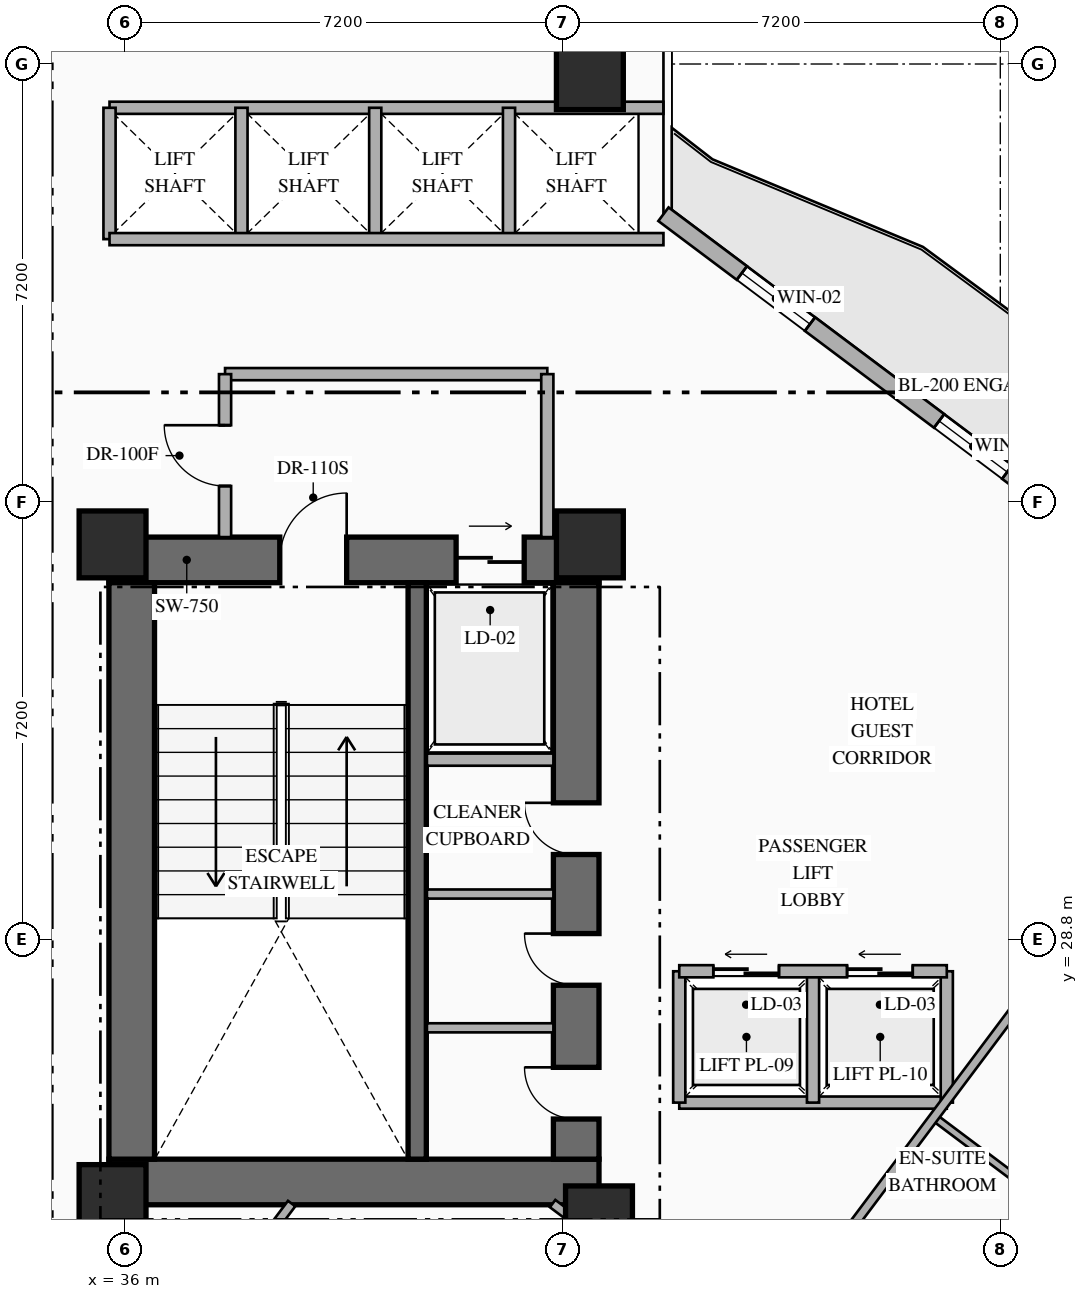
"""IFC4 building model, lengths in metres.
Left out: names, types, materials, properties, quantities, classifications, styles, units other than length and angle.
Written with IfcOpenShell. Run it as: python <this file> out.ifc"""

import sys

from ifc_helpers import new_model, si_unit, direction, frame, frame_2d, origin, origin_2d, place, context, subcontext, project, spatial, rectangle, extrude, element, fill, save


model = new_model("IFC4")
c1 = context("Model", 3, precision=1e-05, world=origin(), true_north=direction((0.0, 1.0)))
c2 = subcontext(c1, "Body", "Model", "MODEL_VIEW")
j1 = project(units=[si_unit("LENGTHUNIT", "METRE"), si_unit("PLANEANGLEUNIT", "RADIAN")], contexts=[c1])
p1 = place(None, origin())
s1 = spatial("IfcSite", under=j1, at=p1, CompositionType="ELEMENT")
p2 = place(p1, origin())
s2 = spatial("IfcBuilding", under=s1, at=p2, CompositionType="ELEMENT")
p3 = place(p2, frame((0.0, 0.0, 81.3)))
s3 = spatial("IfcBuildingStorey", under=s2, at=p3, CompositionType="ELEMENT", Elevation=81.3)
p4 = place(p3, frame((35.74, 24.815, 0.0), z_axis=(0.0, 0.0, 1.0), x_axis=(1.0, 0.0, 0.0)))
e1 = element("IfcWall", 1, at=p4, inside=s3, PredefinedType="SHEAR", context=c2, shape_type="SweptSolid", body=[
    extrude(rectangle(XDim=8.06, YDim=0.75, at=frame_2d((4.03, 0.0))), origin(), (0.0, 0.0, 1.0), 3.35),
])
p5 = place(p3, frame((35.74, 35.045, 0.0), z_axis=(0.0, 0.0, 1.0), x_axis=(1.0, 0.0, 0.0)))
e2 = element("IfcWall", 2, at=p5, inside=s3, PredefinedType="SHEAR", context=c2, shape_type="SweptSolid", body=[
    extrude(rectangle(XDim=8.06, YDim=0.75, at=frame_2d((4.03, 0.0))), origin(), (0.0, 0.0, 1.0), 3.35),
])
p6 = place(p5, frame((2.81, 0.0, 0.0)))
e3 = element("IfcOpeningElement", 3, at=p6, cuts=e2, PredefinedType="OPENING", context=c2, shape_type="SweptSolid", body=[
    extrude(rectangle(XDim=1.1, YDim=2.2, at=frame_2d((0.55, 1.1))), frame((0.0, 0.385, 0.0), z_axis=(0.0, -1.0, 0.0), x_axis=(1.0, 0.0, 0.0)), (0.0, 0.0, 1.0), 0.77),
])
p7 = place(p5, frame((5.71, 0.0, 0.0)))
e4 = element("IfcOpeningElement", 4, at=p7, cuts=e2, PredefinedType="OPENING", context=c2, shape_type="SweptSolid", body=[
    extrude(rectangle(XDim=1.12, YDim=2.15, at=frame_2d((0.56, 1.075))), frame((0.0, 0.385, 0.0), z_axis=(0.0, -1.0, 0.0), x_axis=(1.0, 0.0, 0.0)), (0.0, 0.0, 1.0), 0.77),
])
p8 = place(p3, frame((36.115, 25.19, 0.0), z_axis=(0.0, 0.0, 1.0), x_axis=(0.0, 1.0, 0.0)))
e5 = element("IfcWall", 5, at=p8, inside=s3, PredefinedType="SHEAR", context=c2, shape_type="SweptSolid", body=[
    extrude(rectangle(XDim=9.48, YDim=0.75, at=frame_2d((4.74, 0.0))), origin(), (0.0, 0.0, 1.0), 3.35),
])
p9 = place(p3, frame((43.425, 25.19, 0.0), z_axis=(0.0, 0.0, 1.0), x_axis=(0.0, 1.0, 0.0)))
e6 = element("IfcWall", 6, at=p9, inside=s3, PredefinedType="SHEAR", context=c2, shape_type="SweptSolid", body=[
    extrude(rectangle(XDim=9.48, YDim=0.75, at=frame_2d((4.74, 0.0))), origin(), (0.0, 0.0, 1.0), 3.35),
])
p10 = place(p9, frame((0.66, 0.0, 0.0)))
e7 = element("IfcOpeningElement", 7, at=p10, cuts=e6, PredefinedType="OPENING", context=c2, shape_type="SweptSolid", body=[
    extrude(rectangle(XDim=0.85, YDim=2.08, at=frame_2d((0.425, 1.04))), frame((0.0, 0.385, 0.0), z_axis=(0.0, -1.0, 0.0), x_axis=(1.0, 0.0, 0.0)), (0.0, 0.0, 1.0), 0.77),
])
p11 = place(p9, frame((2.86, 0.0, 0.0)))
e8 = element("IfcOpeningElement", 8, at=p11, cuts=e6, PredefinedType="OPENING", context=c2, shape_type="SweptSolid", body=[
    extrude(rectangle(XDim=0.85, YDim=2.08, at=frame_2d((0.425, 1.04))), frame((0.0, 0.385, 0.0), z_axis=(0.0, -1.0, 0.0), x_axis=(1.0, 0.0, 0.0)), (0.0, 0.0, 1.0), 0.77),
])
p12 = place(p9, frame((5.01, 0.0, 0.0)))
e9 = element("IfcOpeningElement", 9, at=p12, cuts=e6, PredefinedType="OPENING", context=c2, shape_type="SweptSolid", body=[
    extrude(rectangle(XDim=0.85, YDim=2.08, at=frame_2d((0.425, 1.04))), frame((0.0, 0.385, 0.0), z_axis=(0.0, -1.0, 0.0), x_axis=(1.0, 0.0, 0.0)), (0.0, 0.0, 1.0), 0.77),
])
p13 = place(p3, frame((40.81, 25.19, 0.0), z_axis=(0.0, 0.0, 1.0), x_axis=(0.0, 1.0, 0.0)))
e10 = element("IfcWall", 10, at=p13, inside=s3, PredefinedType="SHEAR", context=c2, shape_type="SweptSolid", body=[
    extrude(rectangle(XDim=9.48, YDim=0.3, at=frame_2d((4.74, 0.0))), origin(), (0.0, 0.0, 1.0), 3.35),
])
for number, where, z_axis, x_axis in (
    (11, (35.8, 24.55, 0.0), (0.0, 0.0, 1.0), (1.0, 0.0, 0.0)),
    (12, (43.8, 24.2, 0.0), (0.0, 0.0, 1.0), (1.0, 0.0, 0.0)),
    (13, (35.8, 35.3, 0.0), (0.0, 0.0, 1.0), (1.0, 0.0, 0.0)),
    (14, (43.65, 35.3, 0.0), (0.0, 0.0, 1.0), (1.0, 0.0, 0.0)),
    (15, (43.65, 43.0, 0.0), (0.0, 0.0, 1.0), (1.0, 0.0, 0.0)),
):
    element("IfcColumn", number, at=place(p3, frame(where, z_axis=z_axis, x_axis=x_axis)), inside=s3, PredefinedType="COLUMN", context=c2, shape_type="SweptSolid", body=[
        extrude(rectangle(XDim=1.1, YDim=1.1, at=origin_2d()), origin(), (0.0, 0.0, 1.0), 3.35),
    ])
p14 = place(p3, frame((44.86, 40.73, 0.0), z_axis=(0.0, 0.0, 1.0), x_axis=(0.800006902154, -0.599990797017, 0.0)))
e16 = element("IfcWall", 16, at=p14, inside=s3, PredefinedType="STANDARD", context=c2, shape_type="SweptSolid", body=[
    extrude(rectangle(XDim=29.712, YDim=0.28, at=frame_2d((14.856, 0.0))), origin(), (0.0, 0.0, 1.0), 3.13),
])
p15 = place(p14, frame((14.249, 0.0, 0.0)))
e17 = element("IfcOpeningElement", 17, at=p15, cuts=e16, PredefinedType="OPENING", context=c2, shape_type="SweptSolid", body=[
    extrude(rectangle(XDim=1.1, YDim=2.2, at=frame_2d((0.55, 1.1))), frame((0.0, 0.15, 0.0), z_axis=(0.0, -1.0, 0.0), x_axis=(1.0, 0.0, 0.0)), (0.0, 0.0, 1.0), 0.3),
])
p16 = place(p14, frame((1.612, 0.0, 0.85)))
e18 = element("IfcOpeningElement", 18, at=p16, cuts=e16, PredefinedType="OPENING", context=c2, shape_type="SweptSolid", body=[
    extrude(rectangle(XDim=1.4, YDim=1.8, at=frame_2d((0.7, 0.9))), frame((0.0, 0.15, 0.0), z_axis=(0.0, -1.0, 0.0), x_axis=(1.0, 0.0, 0.0)), (0.0, 0.0, 1.0), 0.3),
])
p17 = place(p14, frame((5.667, 0.0, 0.85)))
e19 = element("IfcOpeningElement", 19, at=p17, cuts=e16, PredefinedType="OPENING", context=c2, shape_type="SweptSolid", body=[
    extrude(rectangle(XDim=1.4, YDim=1.8, at=frame_2d((0.7, 0.9))), frame((0.0, 0.15, 0.0), z_axis=(0.0, -1.0, 0.0), x_axis=(1.0, 0.0, 0.0)), (0.0, 0.0, 1.0), 0.3),
])
p18 = place(p14, frame((9.912, 0.0, 0.85)))
e20 = element("IfcOpeningElement", 20, at=p18, cuts=e16, PredefinedType="OPENING", context=c2, shape_type="SweptSolid", body=[
    extrude(rectangle(XDim=1.4, YDim=1.8, at=frame_2d((0.7, 0.9))), frame((0.0, 0.15, 0.0), z_axis=(0.0, -1.0, 0.0), x_axis=(1.0, 0.0, 0.0)), (0.0, 0.0, 1.0), 0.3),
])
p19 = place(p14, frame((19.528, 0.0, 0.85)))
e21 = element("IfcOpeningElement", 21, at=p19, cuts=e16, PredefinedType="OPENING", context=c2, shape_type="SweptSolid", body=[
    extrude(rectangle(XDim=1.4, YDim=1.8, at=frame_2d((0.7, 0.9))), frame((0.0, 0.15, 0.0), z_axis=(0.0, -1.0, 0.0), x_axis=(1.0, 0.0, 0.0)), (0.0, 0.0, 1.0), 0.3),
])
p20 = place(p14, frame((23.451, 0.0, 0.85)))
e22 = element("IfcOpeningElement", 22, at=p20, cuts=e16, PredefinedType="OPENING", context=c2, shape_type="SweptSolid", body=[
    extrude(rectangle(XDim=1.4, YDim=1.8, at=frame_2d((0.7, 0.9))), frame((0.0, 0.15, 0.0), z_axis=(0.0, -1.0, 0.0), x_axis=(1.0, 0.0, 0.0)), (0.0, 0.0, 1.0), 0.3),
])
p21 = place(p14, frame((27.852, 0.0, 0.85)))
e23 = element("IfcOpeningElement", 23, at=p21, cuts=e16, PredefinedType="OPENING", context=c2, shape_type="SweptSolid", body=[
    extrude(rectangle(XDim=1.4, YDim=1.8, at=frame_2d((0.7, 0.9))), frame((0.0, 0.15, 0.0), z_axis=(0.0, -1.0, 0.0), x_axis=(1.0, 0.0, 0.0)), (0.0, 0.0, 1.0), 0.3),
])
p22 = place(p3, frame((40.97, 31.76, 0.0), z_axis=(0.0, 0.0, 1.0), x_axis=(1.0, 0.0, 0.0)))
e24 = element("IfcWall", 24, at=p22, inside=s3, PredefinedType="STANDARD", context=c2, shape_type="SweptSolid", body=[
    extrude(rectangle(XDim=2.08, YDim=0.2, at=frame_2d((1.04, 0.0))), origin(), (0.0, 0.0, 1.0), 3.13),
])
for number, where, z_axis, x_axis in (
    (25, (40.97, 27.35, 0.0), (0.0, 0.0, 1.0), (1.0, 0.0, 0.0)),
    (26, (40.97, 29.55, 0.0), (0.0, 0.0, 1.0), (1.0, 0.0, 0.0)),
):
    element("IfcWall", number, at=place(p3, frame(where, z_axis=z_axis, x_axis=x_axis)), inside=s3, PredefinedType="PARTITIONING", context=c2, shape_type="SweptSolid", body=[
        extrude(rectangle(XDim=2.08, YDim=0.15, at=frame_2d((1.04, 0.0))), origin(), (0.0, 0.0, 1.0), 3.13),
    ])
p23 = place(p3, frame((37.65, 38.1, 0.0), z_axis=(0.0, 0.0, 1.0), x_axis=(1.0, 0.0, 0.0)))
e27 = element("IfcWall", 27, at=p23, inside=s3, PredefinedType="STANDARD", context=c2, shape_type="SweptSolid", body=[
    extrude(rectangle(XDim=5.3, YDim=0.2, at=frame_2d((2.65, 0.0))), origin(), (0.0, 0.0, 1.0), 3.13),
])
p24 = place(p3, frame((42.95, 35.42, 0.0), z_axis=(0.0, 0.0, 1.0), x_axis=(0.0, 1.0, 0.0)))
e28 = element("IfcWall", 28, at=p24, inside=s3, PredefinedType="STANDARD", context=c2, shape_type="SweptSolid", body=[
    extrude(rectangle(XDim=2.68, YDim=0.2, at=frame_2d((1.34, 0.0))), origin(), (0.0, 0.0, 1.0), 3.13),
])
p25 = place(p3, frame((37.65, 35.42, 0.0), z_axis=(0.0, 0.0, 1.0), x_axis=(0.0, 1.0, 0.0)))
e29 = element("IfcWall", 29, at=p25, inside=s3, PredefinedType="STANDARD", context=c2, shape_type="SweptSolid", body=[
    extrude(rectangle(XDim=2.68, YDim=0.2, at=frame_2d((1.34, 0.0))), origin(), (0.0, 0.0, 1.0), 3.13),
])
p26 = place(p25, frame((0.84, 0.0, 0.0)))
e30 = element("IfcOpeningElement", 30, at=p26, cuts=e29, PredefinedType="OPENING", context=c2, shape_type="SweptSolid", body=[
    extrude(rectangle(XDim=1.0, YDim=2.2, at=frame_2d((0.5, 1.1))), frame((0.0, 0.11, 0.0), z_axis=(0.0, -1.0, 0.0), x_axis=(1.0, 0.0, 0.0)), (0.0, 0.0, 1.0), 0.22),
])
p27 = place(p3, frame((35.75, 42.48, 0.0), z_axis=(0.0, 0.0, 1.0), x_axis=(1.0, 0.0, 0.0)))
e31 = element("IfcWall", 31, at=p27, inside=s3, PredefinedType="STANDARD", context=c2, shape_type="SweptSolid", body=[
    extrude(rectangle(XDim=9.11, YDim=0.2, at=frame_2d((4.555, 0.0))), origin(), (0.0, 0.0, 1.0), 3.13),
])
for number, where, z_axis, x_axis in (
    (32, (35.75, 40.32, 0.0), (0.0, 0.0, 1.0), (0.0, 1.0, 0.0)),
    (33, (37.92, 40.32, 0.0), (0.0, 0.0, 1.0), (0.0, 1.0, 0.0)),
    (34, (40.12, 40.32, 0.0), (0.0, 0.0, 1.0), (0.0, 1.0, 0.0)),
    (35, (42.32, 40.32, 0.0), (0.0, 0.0, 1.0), (0.0, 1.0, 0.0)),
):
    element("IfcWall", number, at=place(p3, frame(where, z_axis=z_axis, x_axis=x_axis)), inside=s3, PredefinedType="STANDARD", context=c2, shape_type="SweptSolid", body=[
        extrude(rectangle(XDim=2.16, YDim=0.2, at=frame_2d((1.08, 0.0))), origin(), (0.0, 0.0, 1.0), 3.13),
    ])
p28 = place(p3, frame((35.75, 40.32, 0.0), z_axis=(0.0, 0.0, 1.0), x_axis=(1.0, 0.0, 0.0)))
e36 = element("IfcWall", 36, at=p28, inside=s3, PredefinedType="STANDARD", context=c2, shape_type="SweptSolid", body=[
    extrude(rectangle(XDim=9.11, YDim=0.2, at=frame_2d((4.555, 0.0))), origin(), (0.0, 0.0, 1.0), 3.13),
])
p29 = place(p3, frame((45.12, 26.12, 0.0), z_axis=(0.0, 0.0, 1.0), x_axis=(1.0, 0.0, 0.0)))
e37 = element("IfcWall", 37, at=p29, inside=s3, PredefinedType="STANDARD", context=c2, shape_type="SweptSolid", body=[
    extrude(rectangle(XDim=4.4, YDim=0.2, at=frame_2d((2.2, 0.0))), origin(), (0.0, 0.0, 1.0), 3.13),
])
for number, where, z_axis, x_axis in (
    (38, (45.12, 26.12, 0.0), (0.0, 0.0, 1.0), (0.0, 1.0, 0.0)),
    (39, (49.52, 26.12, 0.0), (0.0, 0.0, 1.0), (0.0, 1.0, 0.0)),
    (40, (47.32, 26.12, 0.0), (0.0, 0.0, 1.0), (0.0, 1.0, 0.0)),
):
    element("IfcWall", number, at=place(p3, frame(where, z_axis=z_axis, x_axis=x_axis)), inside=s3, PredefinedType="STANDARD", context=c2, shape_type="SweptSolid", body=[
        extrude(rectangle(XDim=2.16, YDim=0.2, at=frame_2d((1.08, 0.0))), origin(), (0.0, 0.0, 1.0), 3.13),
    ])
p30 = place(p3, frame((45.12, 28.28, 0.0), z_axis=(0.0, 0.0, 1.0), x_axis=(1.0, 0.0, 0.0)))
e41 = element("IfcWall", 41, at=p30, inside=s3, PredefinedType="STANDARD", context=c2, shape_type="SweptSolid", body=[
    extrude(rectangle(XDim=4.4, YDim=0.2, at=frame_2d((2.2, 0.0))), origin(), (0.0, 0.0, 1.0), 3.13),
])
p31 = place(p30, frame((0.56, 0.0, 0.0)))
e42 = element("IfcOpeningElement", 42, at=p31, cuts=e41, PredefinedType="OPENING", context=c2, shape_type="SweptSolid", body=[
    extrude(rectangle(XDim=1.08, YDim=2.15, at=frame_2d((0.54, 1.075))), frame((0.0, 0.11, 0.0), z_axis=(0.0, -1.0, 0.0), x_axis=(1.0, 0.0, 0.0)), (0.0, 0.0, 1.0), 0.22),
])
p32 = place(p30, frame((2.76, 0.0, 0.0)))
e43 = element("IfcOpeningElement", 43, at=p32, cuts=e41, PredefinedType="OPENING", context=c2, shape_type="SweptSolid", body=[
    extrude(rectangle(XDim=1.08, YDim=2.15, at=frame_2d((0.54, 1.075))), frame((0.0, 0.11, 0.0), z_axis=(0.0, -1.0, 0.0), x_axis=(1.0, 0.0, 0.0)), (0.0, 0.0, 1.0), 0.22),
])
p33 = place(p3, frame((43.037, 24.46, 0.0), z_axis=(0.0, 0.0, 1.0), x_axis=(0.799971872363, -0.600037501685, 0.0)))
e44 = element("IfcWall", 44, at=p33, inside=s3, PredefinedType="PARTITIONING", context=c2, shape_type="SweptSolid", body=[
    extrude(rectangle(XDim=4.167, YDim=0.15, at=frame_2d((2.083, 0.0))), origin(), (0.0, 0.0, 1.0), 2.425),
])
p34 = place(p33, frame((2.468, 0.0, 0.0)))
e45 = element("IfcOpeningElement", 45, at=p34, cuts=e44, PredefinedType="OPENING", context=c2, shape_type="SweptSolid", body=[
    extrude(rectangle(XDim=0.95, YDim=2.15, at=frame_2d((0.475, 1.075))), frame((0.0, 0.085, 0.0), z_axis=(0.0, -1.0, 0.0), x_axis=(1.0, 0.0, 0.0)), (0.0, 0.0, 1.0), 0.17),
])
p35 = place(p3, frame((33.384, 17.312, 0.0), z_axis=(0.0, 0.0, 1.0), x_axis=(0.600008743659, 0.799993442181, 0.0)))
e46 = element("IfcWall", 46, at=p35, inside=s3, PredefinedType="PARTITIONING", context=c2, shape_type="SweptSolid", body=[
    extrude(rectangle(XDim=8.935, YDim=0.15, at=frame_2d((4.468, 0.0))), origin(), (0.0, 0.0, 1.0), 3.13),
])
p36 = place(p3, frame((49.59, 22.67, 0.0), z_axis=(0.0, 0.0, 1.0), x_axis=(0.599951172744, 0.800036618114, 0.0)))
e47 = element("IfcWall", 47, at=p36, inside=s3, PredefinedType="PARTITIONING", context=c2, shape_type="SweptSolid", body=[
    extrude(rectangle(XDim=2.4, YDim=0.12, at=frame_2d((1.2, 0.0))), origin(), (0.0, 0.0, 1.0), 3.13),
])
p37 = place(p36, frame((0.8, 0.0, 0.0)))
e48 = element("IfcOpeningElement", 48, at=p37, cuts=e47, PredefinedType="OPENING", context=c2, shape_type="SweptSolid", body=[
    extrude(rectangle(XDim=0.8, YDim=2.06, at=frame_2d((0.4, 1.03))), frame((0.0, 0.07, 0.0), z_axis=(0.0, -1.0, 0.0), x_axis=(1.0, 0.0, 0.0)), (0.0, 0.0, 1.0), 0.14),
])
p38 = place(p3, frame((49.31, 25.88, 0.0), z_axis=(0.0, 0.0, 1.0), x_axis=(0.800040880289, -0.59994548908, 0.0)))
e49 = element("IfcWall", 49, at=p38, inside=s3, PredefinedType="PARTITIONING", context=c2, shape_type="SweptSolid", body=[
    extrude(rectangle(XDim=2.15, YDim=0.12, at=frame_2d((1.075, 0.0))), origin(), (0.0, 0.0, 1.0), 3.13),
])
p39 = place(p3, frame((47.87, 23.96, 0.0), z_axis=(0.0, 0.0, 1.0), x_axis=(0.599996617946, 0.80000253653, 0.0)))
e50 = element("IfcWall", 50, at=p39, inside=s3, PredefinedType="PARTITIONING", context=c2, shape_type="SweptSolid", body=[
    extrude(rectangle(XDim=11.55, YDim=0.15, at=frame_2d((5.775, 0.0))), origin(), (0.0, 0.0, 1.0), 3.13),
])
p40 = place(p16, origin())
e51 = element("IfcWindow", 51, at=p40, inside=s3, PartitioningType="SINGLE_PANEL", PredefinedType="WINDOW", context=c2, shape_type="SweptSolid", body=[
    extrude(rectangle(XDim=1.4, YDim=1.8, at=frame_2d((0.7, 0.9))), frame((0.0, 0.03, 0.0), z_axis=(0.0, -1.0, 0.0), x_axis=(1.0, 0.0, 0.0)), (0.0, 0.0, 1.0), 0.06),
])
fill(e18, e51)
p41 = place(p17, origin())
e52 = element("IfcWindow", 52, at=p41, inside=s3, PartitioningType="SINGLE_PANEL", PredefinedType="WINDOW", context=c2, shape_type="SweptSolid", body=[
    extrude(rectangle(XDim=1.4, YDim=1.8, at=frame_2d((0.7, 0.9))), frame((0.0, 0.03, 0.0), z_axis=(0.0, -1.0, 0.0), x_axis=(1.0, 0.0, 0.0)), (0.0, 0.0, 1.0), 0.06),
])
fill(e19, e52)
p42 = place(p6, origin())
e53 = element("IfcDoor", 53, at=p42, inside=s3, OperationType="SINGLE_SWING_RIGHT", PredefinedType="DOOR", context=c2, shape_type="SweptSolid", body=[
    extrude(rectangle(XDim=1.1, YDim=2.2, at=frame_2d((0.55, 1.1))), frame((0.0, 0.025, 0.0), z_axis=(0.0, -1.0, 0.0), x_axis=(1.0, 0.0, 0.0)), (0.0, 0.0, 1.0), 0.05),
])
fill(e3, e53)
p43 = place(p7, origin())
e54 = element("IfcDoor", 54, at=p43, inside=s3, OperationType="SLIDING_TO_RIGHT", PredefinedType="USERDEFINED", context=c2, shape_type="SweptSolid", body=[
    extrude(rectangle(XDim=1.12, YDim=2.15, at=frame_2d((0.56, 1.075))), frame((0.0, 0.025, 0.0), z_axis=(0.0, -1.0, 0.0), x_axis=(1.0, 0.0, 0.0)), (0.0, 0.0, 1.0), 0.05),
])
fill(e4, e54)
p44 = place(p10, origin())
e55 = element("IfcDoor", 55, at=p44, inside=s3, OperationType="SINGLE_SWING_RIGHT", PredefinedType="DOOR", context=c2, shape_type="SweptSolid", body=[
    extrude(rectangle(XDim=0.85, YDim=2.08, at=frame_2d((0.425, 1.04))), frame((0.0, 0.025, 0.0), z_axis=(0.0, -1.0, 0.0), x_axis=(1.0, 0.0, 0.0)), (0.0, 0.0, 1.0), 0.05),
])
fill(e7, e55)
p45 = place(p11, origin())
e56 = element("IfcDoor", 56, at=p45, inside=s3, OperationType="SINGLE_SWING_RIGHT", PredefinedType="DOOR", context=c2, shape_type="SweptSolid", body=[
    extrude(rectangle(XDim=0.85, YDim=2.08, at=frame_2d((0.425, 1.04))), frame((0.0, 0.025, 0.0), z_axis=(0.0, -1.0, 0.0), x_axis=(1.0, 0.0, 0.0)), (0.0, 0.0, 1.0), 0.05),
])
fill(e8, e56)
p46 = place(p12, origin())
e57 = element("IfcDoor", 57, at=p46, inside=s3, OperationType="SINGLE_SWING_RIGHT", PredefinedType="DOOR", context=c2, shape_type="SweptSolid", body=[
    extrude(rectangle(XDim=0.85, YDim=2.08, at=frame_2d((0.425, 1.04))), frame((0.0, 0.025, 0.0), z_axis=(0.0, -1.0, 0.0), x_axis=(1.0, 0.0, 0.0)), (0.0, 0.0, 1.0), 0.05),
])
fill(e9, e57)
p47 = place(p26, origin())
e58 = element("IfcDoor", 58, at=p47, inside=s3, OperationType="SINGLE_SWING_RIGHT", PredefinedType="DOOR", context=c2, shape_type="SweptSolid", body=[
    extrude(rectangle(XDim=1.0, YDim=2.2, at=frame_2d((0.5, 1.1))), frame((0.0, 0.025, 0.0), z_axis=(0.0, -1.0, 0.0), x_axis=(1.0, 0.0, 0.0)), (0.0, 0.0, 1.0), 0.05),
])
fill(e30, e58)
p48 = place(p31, origin())
e59 = element("IfcDoor", 59, at=p48, inside=s3, OperationType="SLIDING_TO_LEFT", PredefinedType="USERDEFINED", context=c2, shape_type="SweptSolid", body=[
    extrude(rectangle(XDim=1.08, YDim=2.15, at=frame_2d((0.54, 1.075))), frame((0.0, 0.025, 0.0), z_axis=(0.0, -1.0, 0.0), x_axis=(1.0, 0.0, 0.0)), (0.0, 0.0, 1.0), 0.05),
])
fill(e42, e59)
p49 = place(p32, origin())
e60 = element("IfcDoor", 60, at=p49, inside=s3, OperationType="SLIDING_TO_LEFT", PredefinedType="USERDEFINED", context=c2, shape_type="SweptSolid", body=[
    extrude(rectangle(XDim=1.08, YDim=2.15, at=frame_2d((0.54, 1.075))), frame((0.0, 0.025, 0.0), z_axis=(0.0, -1.0, 0.0), x_axis=(1.0, 0.0, 0.0)), (0.0, 0.0, 1.0), 0.05),
])
fill(e43, e60)
save(model, sys.argv[1])
